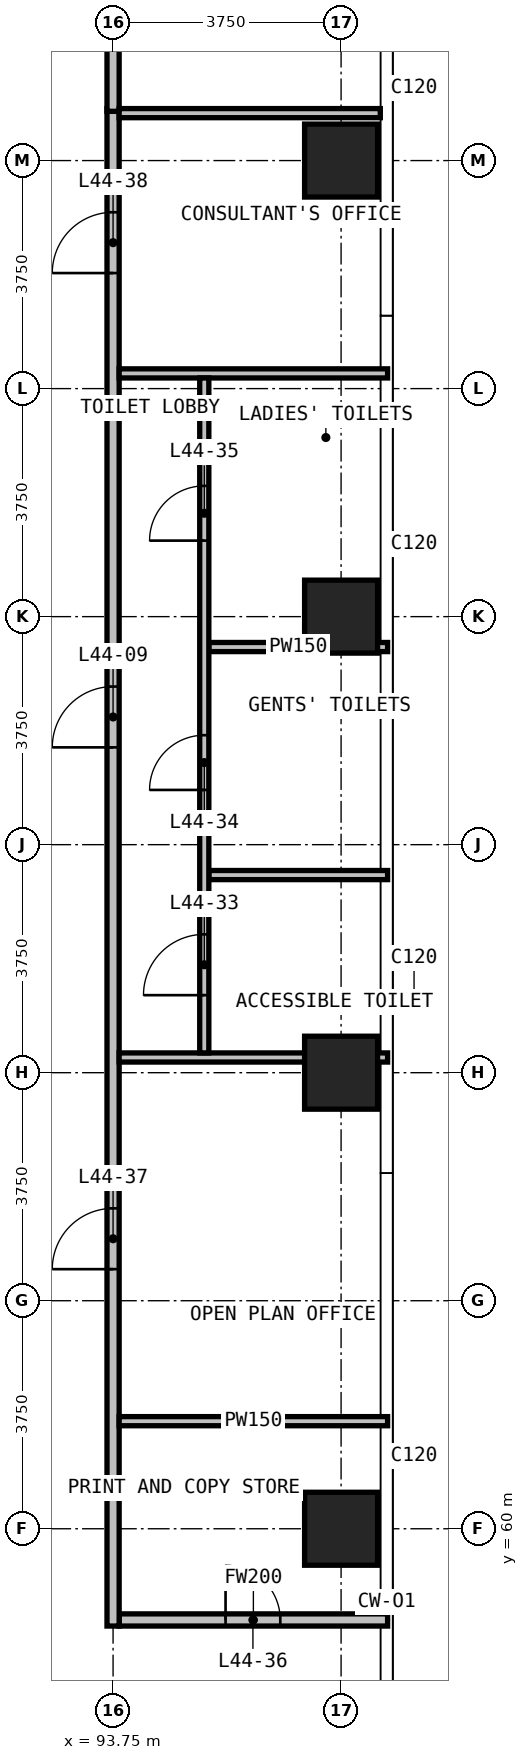
"""IFC4 building model, lengths in metres.
Left out: names, types, materials, properties, quantities, classifications, styles, units other than length and angle.
Written with IfcOpenShell. Run it as: python <this file> out.ifc"""

import sys

from ifc_helpers import new_model, si_unit, direction, frame, frame_2d, origin, origin_2d, place, context, subcontext, project, spatial, rectangle, extrude, element, fill, save


model = new_model("IFC4")
c1 = context("Model", 3, precision=1e-05, world=origin(), true_north=direction((0.0, 1.0)))
c2 = subcontext(c1, "Body", "Model", "MODEL_VIEW")
j1 = project(units=[si_unit("LENGTHUNIT", "METRE"), si_unit("PLANEANGLEUNIT", "RADIAN")], contexts=[c1])
p1 = place(None, origin())
s1 = spatial("IfcSite", under=j1, at=p1, CompositionType="ELEMENT")
p2 = place(p1, origin())
s2 = spatial("IfcBuilding", under=s1, at=p2, CompositionType="ELEMENT")
p3 = place(p2, frame((0.0, 0.0, 172.9)))
s3 = spatial("IfcBuildingStorey", under=s2, at=p3, CompositionType="ELEMENT", Elevation=172.9)
for number, where, z_axis, x_axis in (
    (1, (97.5, 60.0, 0.0), (0.0, 0.0, 1.0), (1.0, 0.0, 0.0)),
    (2, (97.5, 67.5, 0.0), (0.0, 0.0, 1.0), (1.0, 0.0, 0.0)),
    (3, (97.5, 75.0, 0.0), (0.0, 0.0, 1.0), (1.0, 0.0, 0.0)),
    (4, (97.5, 82.5, 0.0), (0.0, 0.0, 1.0), (1.0, 0.0, 0.0)),
):
    element("IfcColumn", number, at=place(p3, frame(where, z_axis=z_axis, x_axis=x_axis)), inside=s3, PredefinedType="COLUMN", context=c2, shape_type="SweptSolid", body=[
        extrude(rectangle(XDim=1.2, YDim=1.2, at=origin_2d()), origin(), (0.0, 0.0, 1.0), 3.6),
    ])
p4 = place(p3, frame((93.85, 58.5, 0.0), z_axis=(0.0, 0.0, 1.0), x_axis=(1.0, 0.0, 0.0)))
e5 = element("IfcWall", 5, at=p4, inside=s3, PredefinedType="PARTITIONING", context=c2, shape_type="SweptSolid", body=[
    extrude(rectangle(XDim=4.415, YDim=0.2, at=frame_2d((2.208, 0.0))), origin(), (0.0, 0.0, 1.0), 3.3),
])
p5 = place(p4, frame((1.75, 0.0, 0.0)))
e6 = element("IfcOpeningElement", 6, at=p5, cuts=e5, PredefinedType="OPENING", context=c2, shape_type="SweptSolid", body=[
    extrude(rectangle(XDim=0.9, YDim=2.2, at=frame_2d((0.45, 1.1))), frame((0.0, 0.11, 0.0), z_axis=(0.0, -1.0, 0.0), x_axis=(1.0, 0.0, 0.0)), (0.0, 0.0, 1.0), 0.22),
])
p6 = place(p3, frame((93.75, 58.4, 0.0), z_axis=(0.0, 0.0, 1.0), x_axis=(0.0, 1.0, 0.0)))
e7 = element("IfcWall", 7, at=p6, inside=s3, PredefinedType="PARTITIONING", context=c2, shape_type="SweptSolid", body=[
    extrude(rectangle(XDim=24.955, YDim=0.2, at=frame_2d((12.478, 0.0))), origin(), (0.0, 0.0, 1.0), 3.3),
])
p7 = place(p6, frame((14.45, 0.0, 0.0)))
e8 = element("IfcOpeningElement", 8, at=p7, cuts=e7, PredefinedType="OPENING", context=c2, shape_type="SweptSolid", body=[
    extrude(rectangle(XDim=1.0, YDim=2.2, at=frame_2d((0.5, 1.1))), frame((0.0, 0.11, 0.0), z_axis=(0.0, -1.0, 0.0), x_axis=(1.0, 0.0, 0.0)), (0.0, 0.0, 1.0), 0.22),
])
p8 = place(p6, frame((5.869, 0.0, 0.0)))
e9 = element("IfcOpeningElement", 9, at=p8, cuts=e7, PredefinedType="OPENING", context=c2, shape_type="SweptSolid", body=[
    extrude(rectangle(XDim=1.0, YDim=2.2, at=frame_2d((0.5, 1.1))), frame((0.0, 0.11, 0.0), z_axis=(0.0, -1.0, 0.0), x_axis=(1.0, 0.0, 0.0)), (0.0, 0.0, 1.0), 0.22),
])
p9 = place(p6, frame((22.25, 0.0, 0.0)))
e10 = element("IfcOpeningElement", 10, at=p9, cuts=e7, PredefinedType="OPENING", context=c2, shape_type="SweptSolid", body=[
    extrude(rectangle(XDim=1.0, YDim=2.2, at=frame_2d((0.5, 1.1))), frame((0.0, 0.11, 0.0), z_axis=(0.0, -1.0, 0.0), x_axis=(1.0, 0.0, 0.0)), (0.0, 0.0, 1.0), 0.22),
])
p10 = place(p3, frame((93.75, 83.31, 0.0), z_axis=(0.0, 0.0, 1.0), x_axis=(0.0, 1.0, 0.0)))
e11 = element("IfcWall", 11, at=p10, inside=s3, PredefinedType="PARTITIONING", context=c2, shape_type="SweptSolid", body=[
    extrude(rectangle(XDim=7.335, YDim=0.2, at=frame_2d((3.667, 0.0))), origin(), (0.0, 0.0, 1.0), 3.3),
])
for number, where, z_axis, x_axis in (
    (12, (93.85, 61.769, 0.0), (0.0, 0.0, 1.0), (1.0, 0.0, 0.0)),
    (13, (93.85, 67.75, 0.0), (0.0, 0.0, 1.0), (1.0, 0.0, 0.0)),
):
    element("IfcWall", number, at=place(p3, frame(where, z_axis=z_axis, x_axis=x_axis)), inside=s3, PredefinedType="PARTITIONING", context=c2, shape_type="SweptSolid", body=[
        extrude(rectangle(XDim=4.415, YDim=0.15, at=frame_2d((2.208, 0.0))), origin(), (0.0, 0.0, 1.0), 3.3),
    ])
for number, where, z_axis, x_axis in (
    (14, (95.325, 70.75, 0.0), (0.0, 0.0, 1.0), (1.0, 0.0, 0.0)),
    (15, (95.325, 74.5, 0.0), (0.0, 0.0, 1.0), (1.0, 0.0, 0.0)),
):
    element("IfcWall", number, at=place(p3, frame(where, z_axis=z_axis, x_axis=x_axis)), inside=s3, PredefinedType="PARTITIONING", context=c2, shape_type="SweptSolid", body=[
        extrude(rectangle(XDim=2.94, YDim=0.15, at=frame_2d((1.47, 0.0))), origin(), (0.0, 0.0, 1.0), 3.3),
    ])
p11 = place(p3, frame((93.85, 79.0, 0.0), z_axis=(0.0, 0.0, 1.0), x_axis=(1.0, 0.0, 0.0)))
e16 = element("IfcWall", 16, at=p11, inside=s3, PredefinedType="PARTITIONING", context=c2, shape_type="SweptSolid", body=[
    extrude(rectangle(XDim=4.415, YDim=0.15, at=frame_2d((2.208, 0.0))), origin(), (0.0, 0.0, 1.0), 3.3),
])
p12 = place(p3, frame((93.85, 83.28, 0.0), z_axis=(0.0, 0.0, 1.0), x_axis=(1.0, 0.0, 0.0)))
e17 = element("IfcWall", 17, at=p12, inside=s3, PredefinedType="PARTITIONING", context=c2, shape_type="SweptSolid", body=[
    extrude(rectangle(XDim=4.295, YDim=0.15, at=frame_2d((2.147, 0.0))), origin(), (0.0, 0.0, 1.0), 3.3),
])
p13 = place(p3, frame((95.25, 67.825, 0.0), z_axis=(0.0, 0.0, 1.0), x_axis=(0.0, 1.0, 0.0)))
e18 = element("IfcWall", 18, at=p13, inside=s3, PredefinedType="PARTITIONING", context=c2, shape_type="SweptSolid", body=[
    extrude(rectangle(XDim=11.1, YDim=0.15, at=frame_2d((5.55, 0.0))), origin(), (0.0, 0.0, 1.0), 3.3),
])
p14 = place(p13, frame((0.95, 0.0, 0.0)))
e19 = element("IfcOpeningElement", 19, at=p14, cuts=e18, PredefinedType="OPENING", context=c2, shape_type="SweptSolid", body=[
    extrude(rectangle(XDim=1.0, YDim=2.2, at=frame_2d((0.5, 1.1))), frame((0.0, 0.085, 0.0), z_axis=(0.0, -1.0, 0.0), x_axis=(1.0, 0.0, 0.0)), (0.0, 0.0, 1.0), 0.17),
])
p15 = place(p13, frame((4.325, 0.0, 0.0)))
e20 = element("IfcOpeningElement", 20, at=p15, cuts=e18, PredefinedType="OPENING", context=c2, shape_type="SweptSolid", body=[
    extrude(rectangle(XDim=0.9, YDim=2.2, at=frame_2d((0.45, 1.1))), frame((0.0, 0.085, 0.0), z_axis=(0.0, -1.0, 0.0), x_axis=(1.0, 0.0, 0.0)), (0.0, 0.0, 1.0), 0.17),
])
p16 = place(p13, frame((8.425, 0.0, 0.0)))
e21 = element("IfcOpeningElement", 21, at=p16, cuts=e18, PredefinedType="OPENING", context=c2, shape_type="SweptSolid", body=[
    extrude(rectangle(XDim=0.9, YDim=2.2, at=frame_2d((0.45, 1.1))), frame((0.0, 0.085, 0.0), z_axis=(0.0, -1.0, 0.0), x_axis=(1.0, 0.0, 0.0)), (0.0, 0.0, 1.0), 0.17),
])
p17 = place(p7, origin())
e22 = element("IfcDoor", 22, at=p17, inside=s3, OperationType="SINGLE_SWING_LEFT", PredefinedType="DOOR", context=c2, shape_type="SweptSolid", body=[
    extrude(rectangle(XDim=1.0, YDim=2.2, at=frame_2d((0.5, 1.1))), frame((0.0, 0.025, 0.0), z_axis=(0.0, -1.0, 0.0), x_axis=(1.0, 0.0, 0.0)), (0.0, 0.0, 1.0), 0.05),
])
fill(e8, e22)
p18 = place(p14, origin())
e23 = element("IfcDoor", 23, at=p18, inside=s3, OperationType="SINGLE_SWING_LEFT", PredefinedType="DOOR", context=c2, shape_type="SweptSolid", body=[
    extrude(rectangle(XDim=1.0, YDim=2.2, at=frame_2d((0.5, 1.1))), frame((0.0, 0.025, 0.0), z_axis=(0.0, -1.0, 0.0), x_axis=(1.0, 0.0, 0.0)), (0.0, 0.0, 1.0), 0.05),
])
fill(e19, e23)
p19 = place(p15, origin())
e24 = element("IfcDoor", 24, at=p19, inside=s3, OperationType="SINGLE_SWING_LEFT", PredefinedType="DOOR", context=c2, shape_type="SweptSolid", body=[
    extrude(rectangle(XDim=0.9, YDim=2.2, at=frame_2d((0.45, 1.1))), frame((0.0, 0.025, 0.0), z_axis=(0.0, -1.0, 0.0), x_axis=(1.0, 0.0, 0.0)), (0.0, 0.0, 1.0), 0.05),
])
fill(e20, e24)
p20 = place(p16, origin())
e25 = element("IfcDoor", 25, at=p20, inside=s3, OperationType="SINGLE_SWING_LEFT", PredefinedType="DOOR", context=c2, shape_type="SweptSolid", body=[
    extrude(rectangle(XDim=0.9, YDim=2.2, at=frame_2d((0.45, 1.1))), frame((0.0, 0.025, 0.0), z_axis=(0.0, -1.0, 0.0), x_axis=(1.0, 0.0, 0.0)), (0.0, 0.0, 1.0), 0.05),
])
fill(e21, e25)
p21 = place(p5, origin())
e26 = element("IfcDoor", 26, at=p21, inside=s3, OperationType="SINGLE_SWING_LEFT", PredefinedType="DOOR", context=c2, shape_type="SweptSolid", body=[
    extrude(rectangle(XDim=0.9, YDim=2.2, at=frame_2d((0.45, 1.1))), frame((0.0, 0.025, 0.0), z_axis=(0.0, -1.0, 0.0), x_axis=(1.0, 0.0, 0.0)), (0.0, 0.0, 1.0), 0.05),
])
fill(e6, e26)
p22 = place(p8, origin())
e27 = element("IfcDoor", 27, at=p22, inside=s3, OperationType="SINGLE_SWING_RIGHT", PredefinedType="DOOR", context=c2, shape_type="SweptSolid", body=[
    extrude(rectangle(XDim=1.0, YDim=2.2, at=frame_2d((0.5, 1.1))), frame((0.0, 0.025, 0.0), z_axis=(0.0, -1.0, 0.0), x_axis=(1.0, 0.0, 0.0)), (0.0, 0.0, 1.0), 0.05),
])
fill(e9, e27)
p23 = place(p9, origin())
e28 = element("IfcDoor", 28, at=p23, inside=s3, OperationType="SINGLE_SWING_RIGHT", PredefinedType="DOOR", context=c2, shape_type="SweptSolid", body=[
    extrude(rectangle(XDim=1.0, YDim=2.2, at=frame_2d((0.5, 1.1))), frame((0.0, 0.025, 0.0), z_axis=(0.0, -1.0, 0.0), x_axis=(1.0, 0.0, 0.0)), (0.0, 0.0, 1.0), 0.05),
])
fill(e10, e28)
save(model, sys.argv[1])
